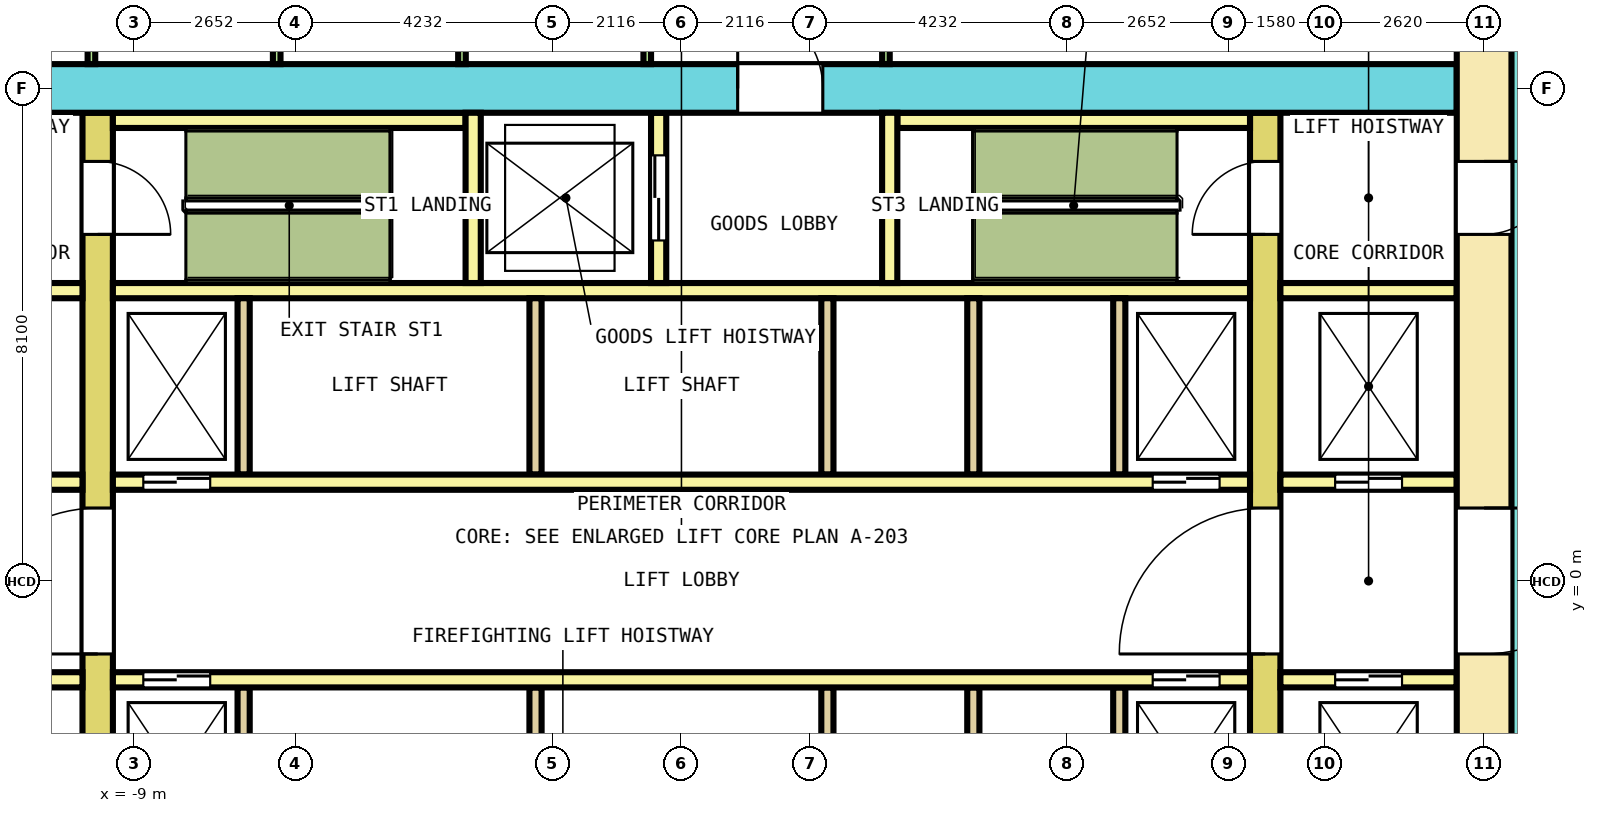
"""IFC4 building model, lengths in metres.
Left out: names, types, materials, properties, quantities, classifications, styles, units other than length and angle.
Written with IfcOpenShell. Run it as: python <this file> out.ifc"""

import sys

from ifc_helpers import new_model, si_unit, direction, frame, frame_2d, origin, place, context, subcontext, project, spatial, rectangle, extrude, element, fill, save


model = new_model("IFC4")
c1 = context("Model", 3, precision=1e-05, world=origin(), true_north=direction((0.0, 1.0)))
c2 = subcontext(c1, "Body", "Model", "MODEL_VIEW")
j1 = project(units=[si_unit("LENGTHUNIT", "METRE"), si_unit("PLANEANGLEUNIT", "RADIAN")], contexts=[c1])
p1 = place(None, origin())
s1 = spatial("IfcSite", under=j1, at=p1, CompositionType="ELEMENT")
p2 = place(p1, origin())
s2 = spatial("IfcBuilding", under=s1, at=p2, CompositionType="ELEMENT")
p3 = place(p2, frame((0.0, 0.0, 5.6)))
s3 = spatial("IfcBuildingStorey", under=s2, at=p3, CompositionType="ELEMENT", Elevation=5.6)
p4 = place(p3, frame((13.2, -10.35, 0.0), z_axis=(0.0, 0.0, 1.0), x_axis=(0.0, 1.0, 0.0)))
e1 = element("IfcWall", 1, at=p4, inside=s3, PredefinedType="SHEAR", context=c2, shape_type="SweptSolid", body=[
    extrude(rectangle(XDim=20.7, YDim=0.9, at=frame_2d((10.35, 0.0))), origin(), (0.0, 0.0, 1.0), 4.3),
])
p5 = place(p4, frame((9.15, 0.0, 0.0)))
e2 = element("IfcOpeningElement", 2, at=p5, cuts=e1, PredefinedType="OPENING", context=c2, shape_type="SweptSolid", body=[
    extrude(rectangle(XDim=2.4, YDim=2.1, at=frame_2d((1.2, 1.05))), frame((0.0, 0.46, 0.0), z_axis=(0.0, -1.0, 0.0), x_axis=(1.0, 0.0, 0.0)), (0.0, 0.0, 1.0), 0.92),
])
p6 = place(p4, frame((16.05, 0.0, 0.0)))
e3 = element("IfcOpeningElement", 3, at=p6, cuts=e1, PredefinedType="OPENING", context=c2, shape_type="SweptSolid", body=[
    extrude(rectangle(XDim=1.2, YDim=2.1, at=frame_2d((0.6, 1.05))), frame((0.0, 0.46, 0.0), z_axis=(0.0, -1.0, 0.0), x_axis=(1.0, 0.0, 0.0)), (0.0, 0.0, 1.0), 0.92),
])
p7 = place(p4, frame((2.819, 0.0, 0.0)))
e4 = element("IfcOpeningElement", 4, at=p7, cuts=e1, PredefinedType="OPENING", context=c2, shape_type="SweptSolid", body=[
    extrude(rectangle(XDim=1.0, YDim=2.1, at=frame_2d((0.5, 1.05))), frame((0.0, 0.46, 0.0), z_axis=(0.0, -1.0, 0.0), x_axis=(1.0, 0.0, 0.0)), (0.0, 0.0, 1.0), 0.92),
])
p8 = place(p4, frame((4.281, 0.0, 0.0)))
e5 = element("IfcOpeningElement", 5, at=p8, cuts=e1, PredefinedType="OPENING", context=c2, shape_type="SweptSolid", body=[
    extrude(rectangle(XDim=1.0, YDim=2.1, at=frame_2d((0.5, 1.05))), frame((0.0, 0.46, 0.0), z_axis=(0.0, -1.0, 0.0), x_axis=(1.0, 0.0, 0.0)), (0.0, 0.0, 1.0), 0.92),
])
p9 = place(p3, frame((-12.75, 8.1, 0.0), z_axis=(0.0, 0.0, 1.0), x_axis=(1.0, 0.0, 0.0)))
e6 = element("IfcWall", 6, at=p9, inside=s3, PredefinedType="SHEAR", context=c2, shape_type="SweptSolid", body=[
    extrude(rectangle(XDim=25.5, YDim=0.8, at=frame_2d((12.75, 0.0))), origin(), (0.0, 0.0, 1.0), 4.3),
])
p10 = place(p9, frame((13.675, 0.0, 0.0)))
e7 = element("IfcOpeningElement", 7, at=p10, cuts=e6, PredefinedType="OPENING", context=c2, shape_type="SweptSolid", body=[
    extrude(rectangle(XDim=1.4, YDim=2.1, at=frame_2d((0.7, 1.05))), frame((0.0, 0.41, 0.0), z_axis=(0.0, -1.0, 0.0), x_axis=(1.0, 0.0, 0.0)), (0.0, 0.0, 1.0), 0.82),
])
p11 = place(p3, frame((-9.6, -7.7, 0.0), z_axis=(0.0, 0.0, 1.0), x_axis=(0.0, 1.0, 0.0)))
e8 = element("IfcWall", 8, at=p11, inside=s3, PredefinedType="SHEAR", context=c2, shape_type="SweptSolid", body=[
    extrude(rectangle(XDim=15.4, YDim=0.5, at=frame_2d((7.7, 0.0))), origin(), (0.0, 0.0, 1.0), 4.3),
])
p12 = place(p11, frame((6.5, 0.0, 0.0)))
e9 = element("IfcOpeningElement", 9, at=p12, cuts=e8, PredefinedType="OPENING", context=c2, shape_type="SweptSolid", body=[
    extrude(rectangle(XDim=2.4, YDim=2.1, at=frame_2d((1.2, 1.05))), frame((0.0, 0.26, 0.0), z_axis=(0.0, -1.0, 0.0), x_axis=(1.0, 0.0, 0.0)), (0.0, 0.0, 1.0), 0.52),
])
p13 = place(p11, frame((13.4, 0.0, 0.0)))
e10 = element("IfcOpeningElement", 10, at=p13, cuts=e8, PredefinedType="OPENING", context=c2, shape_type="SweptSolid", body=[
    extrude(rectangle(XDim=1.2, YDim=2.1, at=frame_2d((0.6, 1.05))), frame((0.0, 0.26, 0.0), z_axis=(0.0, -1.0, 0.0), x_axis=(1.0, 0.0, 0.0)), (0.0, 0.0, 1.0), 0.52),
])
p14 = place(p11, frame((0.8, 0.0, 0.0)))
e11 = element("IfcOpeningElement", 11, at=p14, cuts=e8, PredefinedType="OPENING", context=c2, shape_type="SweptSolid", body=[
    extrude(rectangle(XDim=1.2, YDim=2.1, at=frame_2d((0.6, 1.05))), frame((0.0, 0.26, 0.0), z_axis=(0.0, -1.0, 0.0), x_axis=(1.0, 0.0, 0.0)), (0.0, 0.0, 1.0), 0.52),
])
p15 = place(p3, frame((9.6, -7.7, 0.0), z_axis=(0.0, 0.0, 1.0), x_axis=(0.0, 1.0, 0.0)))
e12 = element("IfcWall", 12, at=p15, inside=s3, PredefinedType="SHEAR", context=c2, shape_type="SweptSolid", body=[
    extrude(rectangle(XDim=15.4, YDim=0.5, at=frame_2d((7.7, 0.0))), origin(), (0.0, 0.0, 1.0), 4.3),
])
p16 = place(p15, frame((6.5, 0.0, 0.0)))
e13 = element("IfcOpeningElement", 13, at=p16, cuts=e12, PredefinedType="OPENING", context=c2, shape_type="SweptSolid", body=[
    extrude(rectangle(XDim=2.4, YDim=2.1, at=frame_2d((1.2, 1.05))), frame((0.0, 0.26, 0.0), z_axis=(0.0, -1.0, 0.0), x_axis=(1.0, 0.0, 0.0)), (0.0, 0.0, 1.0), 0.52),
])
p17 = place(p15, frame((13.4, 0.0, 0.0)))
e14 = element("IfcOpeningElement", 14, at=p17, cuts=e12, PredefinedType="OPENING", context=c2, shape_type="SweptSolid", body=[
    extrude(rectangle(XDim=1.2, YDim=2.1, at=frame_2d((0.6, 1.05))), frame((0.0, 0.26, 0.0), z_axis=(0.0, -1.0, 0.0), x_axis=(1.0, 0.0, 0.0)), (0.0, 0.0, 1.0), 0.52),
])
p18 = place(p15, frame((0.9, 0.0, 0.0)))
e15 = element("IfcOpeningElement", 15, at=p18, cuts=e12, PredefinedType="OPENING", context=c2, shape_type="SweptSolid", body=[
    extrude(rectangle(XDim=1.0, YDim=2.1, at=frame_2d((0.5, 1.05))), frame((0.0, 0.26, 0.0), z_axis=(0.0, -1.0, 0.0), x_axis=(1.0, 0.0, 0.0)), (0.0, 0.0, 1.0), 0.52),
])
p19 = place(p3, frame((-12.75, 1.625, 0.0), z_axis=(0.0, 0.0, 1.0), x_axis=(1.0, 0.0, 0.0)))
e16 = element("IfcWall", 16, at=p19, inside=s3, PredefinedType="SOLIDWALL", context=c2, shape_type="SweptSolid", body=[
    extrude(rectangle(XDim=2.9, YDim=0.25, at=frame_2d((1.45, 0.0))), origin(), (0.0, 0.0, 1.0), 4.3),
])
p20 = place(p19, frame((0.9, 0.0, 0.0)))
e17 = element("IfcOpeningElement", 17, at=p20, cuts=e16, PredefinedType="OPENING", context=c2, shape_type="SweptSolid", body=[
    extrude(rectangle(XDim=1.1, YDim=2.1, at=frame_2d((0.55, 1.05))), frame((0.0, 0.135, 0.0), z_axis=(0.0, -1.0, 0.0), x_axis=(1.0, 0.0, 0.0)), (0.0, 0.0, 1.0), 0.27),
])
p21 = place(p3, frame((-9.35, 1.625, 0.0), z_axis=(0.0, 0.0, 1.0), x_axis=(1.0, 0.0, 0.0)))
e18 = element("IfcWall", 18, at=p21, inside=s3, PredefinedType="SOLIDWALL", context=c2, shape_type="SweptSolid", body=[
    extrude(rectangle(XDim=18.7, YDim=0.25, at=frame_2d((9.35, 0.0))), origin(), (0.0, 0.0, 1.0), 4.3),
])
p22 = place(p21, frame((0.5, 0.0, 0.0)))
e19 = element("IfcOpeningElement", 19, at=p22, cuts=e18, PredefinedType="OPENING", context=c2, shape_type="SweptSolid", body=[
    extrude(rectangle(XDim=1.1, YDim=2.1, at=frame_2d((0.55, 1.05))), frame((0.0, 0.135, 0.0), z_axis=(0.0, -1.0, 0.0), x_axis=(1.0, 0.0, 0.0)), (0.0, 0.0, 1.0), 0.27),
])
p23 = place(p21, frame((17.1, 0.0, 0.0)))
e20 = element("IfcOpeningElement", 20, at=p23, cuts=e18, PredefinedType="OPENING", context=c2, shape_type="SweptSolid", body=[
    extrude(rectangle(XDim=1.1, YDim=2.1, at=frame_2d((0.55, 1.05))), frame((0.0, 0.135, 0.0), z_axis=(0.0, -1.0, 0.0), x_axis=(1.0, 0.0, 0.0)), (0.0, 0.0, 1.0), 0.27),
])
p24 = place(p3, frame((9.85, 1.625, 0.0), z_axis=(0.0, 0.0, 1.0), x_axis=(1.0, 0.0, 0.0)))
e21 = element("IfcWall", 21, at=p24, inside=s3, PredefinedType="SOLIDWALL", context=c2, shape_type="SweptSolid", body=[
    extrude(rectangle(XDim=2.9, YDim=0.25, at=frame_2d((1.45, 0.0))), origin(), (0.0, 0.0, 1.0), 4.3),
])
p25 = place(p24, frame((0.9, 0.0, 0.0)))
e22 = element("IfcOpeningElement", 22, at=p25, cuts=e21, PredefinedType="OPENING", context=c2, shape_type="SweptSolid", body=[
    extrude(rectangle(XDim=1.1, YDim=2.1, at=frame_2d((0.55, 1.05))), frame((0.0, 0.135, 0.0), z_axis=(0.0, -1.0, 0.0), x_axis=(1.0, 0.0, 0.0)), (0.0, 0.0, 1.0), 0.27),
])
p26 = place(p3, frame((-12.75, 4.775, 0.0), z_axis=(0.0, 0.0, 1.0), x_axis=(1.0, 0.0, 0.0)))
e23 = element("IfcWall", 23, at=p26, inside=s3, PredefinedType="SOLIDWALL", context=c2, shape_type="SweptSolid", body=[
    extrude(rectangle(XDim=2.9, YDim=0.25, at=frame_2d((1.45, 0.0))), origin(), (0.0, 0.0, 1.0), 4.3),
])
p27 = place(p3, frame((-9.35, 4.775, 0.0), z_axis=(0.0, 0.0, 1.0), x_axis=(1.0, 0.0, 0.0)))
e24 = element("IfcWall", 24, at=p27, inside=s3, PredefinedType="SOLIDWALL", context=c2, shape_type="SweptSolid", body=[
    extrude(rectangle(XDim=18.7, YDim=0.25, at=frame_2d((9.35, 0.0))), origin(), (0.0, 0.0, 1.0), 4.3),
])
p28 = place(p3, frame((9.85, 4.775, 0.0), z_axis=(0.0, 0.0, 1.0), x_axis=(1.0, 0.0, 0.0)))
e25 = element("IfcWall", 25, at=p28, inside=s3, PredefinedType="SOLIDWALL", context=c2, shape_type="SweptSolid", body=[
    extrude(rectangle(XDim=2.9, YDim=0.25, at=frame_2d((1.45, 0.0))), origin(), (0.0, 0.0, 1.0), 4.3),
])
for number, where, z_axis, x_axis in (
    (26, (-7.2, 1.75, 0.0), (0.0, 0.0, 1.0), (0.0, 1.0, 0.0)),
    (27, (-2.4, 1.75, 0.0), (0.0, 0.0, 1.0), (0.0, 1.0, 0.0)),
    (28, (2.4, 1.75, 0.0), (0.0, 0.0, 1.0), (0.0, 1.0, 0.0)),
    (29, (4.8, 1.75, 0.0), (0.0, 0.0, 1.0), (0.0, 1.0, 0.0)),
    (30, (7.2, 1.75, 0.0), (0.0, 0.0, 1.0), (0.0, 1.0, 0.0)),
):
    element("IfcWall", number, at=place(p3, frame(where, z_axis=z_axis, x_axis=x_axis)), inside=s3, PredefinedType="SOLIDWALL", context=c2, shape_type="SweptSolid", body=[
        extrude(rectangle(XDim=2.9, YDim=0.2, at=frame_2d((1.45, 0.0))), origin(), (0.0, 0.0, 1.0), 4.3),
    ])
p29 = place(p3, frame((-12.75, -1.625, 0.0), z_axis=(0.0, 0.0, 1.0), x_axis=(1.0, 0.0, 0.0)))
e31 = element("IfcWall", 31, at=p29, inside=s3, PredefinedType="SOLIDWALL", context=c2, shape_type="SweptSolid", body=[
    extrude(rectangle(XDim=2.9, YDim=0.25, at=frame_2d((1.45, 0.0))), origin(), (0.0, 0.0, 1.0), 4.3),
])
p30 = place(p29, frame((0.9, 0.0, 0.0)))
e32 = element("IfcOpeningElement", 32, at=p30, cuts=e31, PredefinedType="OPENING", context=c2, shape_type="SweptSolid", body=[
    extrude(rectangle(XDim=1.1, YDim=2.1, at=frame_2d((0.55, 1.05))), frame((0.0, 0.135, 0.0), z_axis=(0.0, -1.0, 0.0), x_axis=(1.0, 0.0, 0.0)), (0.0, 0.0, 1.0), 0.27),
])
p31 = place(p3, frame((-9.35, -1.625, 0.0), z_axis=(0.0, 0.0, 1.0), x_axis=(1.0, 0.0, 0.0)))
e33 = element("IfcWall", 33, at=p31, inside=s3, PredefinedType="SOLIDWALL", context=c2, shape_type="SweptSolid", body=[
    extrude(rectangle(XDim=18.7, YDim=0.25, at=frame_2d((9.35, 0.0))), origin(), (0.0, 0.0, 1.0), 4.3),
])
p32 = place(p31, frame((0.5, 0.0, 0.0)))
e34 = element("IfcOpeningElement", 34, at=p32, cuts=e33, PredefinedType="OPENING", context=c2, shape_type="SweptSolid", body=[
    extrude(rectangle(XDim=1.1, YDim=2.1, at=frame_2d((0.55, 1.05))), frame((0.0, 0.135, 0.0), z_axis=(0.0, -1.0, 0.0), x_axis=(1.0, 0.0, 0.0)), (0.0, 0.0, 1.0), 0.27),
])
p33 = place(p31, frame((17.1, 0.0, 0.0)))
e35 = element("IfcOpeningElement", 35, at=p33, cuts=e33, PredefinedType="OPENING", context=c2, shape_type="SweptSolid", body=[
    extrude(rectangle(XDim=1.1, YDim=2.1, at=frame_2d((0.55, 1.05))), frame((0.0, 0.135, 0.0), z_axis=(0.0, -1.0, 0.0), x_axis=(1.0, 0.0, 0.0)), (0.0, 0.0, 1.0), 0.27),
])
p34 = place(p3, frame((9.85, -1.625, 0.0), z_axis=(0.0, 0.0, 1.0), x_axis=(1.0, 0.0, 0.0)))
e36 = element("IfcWall", 36, at=p34, inside=s3, PredefinedType="SOLIDWALL", context=c2, shape_type="SweptSolid", body=[
    extrude(rectangle(XDim=2.9, YDim=0.25, at=frame_2d((1.45, 0.0))), origin(), (0.0, 0.0, 1.0), 4.3),
])
p35 = place(p34, frame((0.9, 0.0, 0.0)))
e37 = element("IfcOpeningElement", 37, at=p35, cuts=e36, PredefinedType="OPENING", context=c2, shape_type="SweptSolid", body=[
    extrude(rectangle(XDim=1.1, YDim=2.1, at=frame_2d((0.55, 1.05))), frame((0.0, 0.135, 0.0), z_axis=(0.0, -1.0, 0.0), x_axis=(1.0, 0.0, 0.0)), (0.0, 0.0, 1.0), 0.27),
])
for number, where, z_axis, x_axis in (
    (38, (-7.2, -4.65, 0.0), (0.0, 0.0, 1.0), (0.0, 1.0, 0.0)),
    (39, (-2.4, -4.65, 0.0), (0.0, 0.0, 1.0), (0.0, 1.0, 0.0)),
    (40, (2.4, -4.65, 0.0), (0.0, 0.0, 1.0), (0.0, 1.0, 0.0)),
    (41, (4.8, -4.65, 0.0), (0.0, 0.0, 1.0), (0.0, 1.0, 0.0)),
    (42, (7.2, -4.65, 0.0), (0.0, 0.0, 1.0), (0.0, 1.0, 0.0)),
):
    element("IfcWall", number, at=place(p3, frame(where, z_axis=z_axis, x_axis=x_axis)), inside=s3, PredefinedType="SOLIDWALL", context=c2, shape_type="SweptSolid", body=[
        extrude(rectangle(XDim=2.9, YDim=0.2, at=frame_2d((1.45, 0.0))), origin(), (0.0, 0.0, 1.0), 4.3),
    ])
for number, where, z_axis, x_axis in (
    (43, (-9.35, 7.575, 0.0), (0.0, 0.0, 1.0), (1.0, 0.0, 0.0)),
    (44, (3.55, 7.575, 0.0), (0.0, 0.0, 1.0), (1.0, 0.0, 0.0)),
):
    element("IfcWall", number, at=place(p3, frame(where, z_axis=z_axis, x_axis=x_axis)), inside=s3, PredefinedType="SOLIDWALL", context=c2, shape_type="SweptSolid", body=[
        extrude(rectangle(XDim=5.8, YDim=0.25, at=frame_2d((2.9, 0.0))), origin(), (0.0, 0.0, 1.0), 4.3),
    ])
p36 = place(p3, frame((-3.425, 4.9, 0.0), z_axis=(0.0, 0.0, 1.0), x_axis=(0.0, 1.0, 0.0)))
e45 = element("IfcWall", 45, at=p36, inside=s3, PredefinedType="SOLIDWALL", context=c2, shape_type="SweptSolid", body=[
    extrude(rectangle(XDim=2.8, YDim=0.25, at=frame_2d((1.4, 0.0))), origin(), (0.0, 0.0, 1.0), 4.3),
])
p37 = place(p3, frame((-0.375, 4.9, 0.0), z_axis=(0.0, 0.0, 1.0), x_axis=(0.0, 1.0, 0.0)))
e46 = element("IfcWall", 46, at=p37, inside=s3, PredefinedType="SOLIDWALL", context=c2, shape_type="SweptSolid", body=[
    extrude(rectangle(XDim=2.8, YDim=0.25, at=frame_2d((1.4, 0.0))), origin(), (0.0, 0.0, 1.0), 4.3),
])
p38 = place(p37, frame((0.7, 0.0, 0.0)))
e47 = element("IfcOpeningElement", 47, at=p38, cuts=e46, PredefinedType="OPENING", context=c2, shape_type="SweptSolid", body=[
    extrude(rectangle(XDim=1.4, YDim=2.1, at=frame_2d((0.7, 1.05))), frame((0.0, 0.135, 0.0), z_axis=(0.0, -1.0, 0.0), x_axis=(1.0, 0.0, 0.0)), (0.0, 0.0, 1.0), 0.27),
])
p39 = place(p3, frame((3.425, 4.9, 0.0), z_axis=(0.0, 0.0, 1.0), x_axis=(0.0, 1.0, 0.0)))
e48 = element("IfcWall", 48, at=p39, inside=s3, PredefinedType="SOLIDWALL", context=c2, shape_type="SweptSolid", body=[
    extrude(rectangle(XDim=2.8, YDim=0.25, at=frame_2d((1.4, 0.0))), origin(), (0.0, 0.0, 1.0), 4.3),
])
for number, where, z_axis, x_axis in (
    (49, (-9.703, 8.5, 0.0), (0.0, 0.0, 1.0), (0.0, 1.0, 0.0)),
    (50, (-6.656, 8.5, 0.0), (0.0, 0.0, 1.0), (0.0, 1.0, 0.0)),
    (51, (-3.609, 8.5, 0.0), (0.0, 0.0, 1.0), (0.0, 1.0, 0.0)),
    (52, (-0.562, 8.5, 0.0), (0.0, 0.0, 1.0), (0.0, 1.0, 0.0)),
    (53, (3.363, 8.5, 0.0), (0.0, 0.0, 1.0), (0.0, 1.0, 0.0)),
):
    element("IfcWall", number, at=place(p3, frame(where, z_axis=z_axis, x_axis=x_axis)), inside=s3, PredefinedType="PARTITIONING", context=c2, shape_type="SweptSolid", body=[
        extrude(rectangle(XDim=1.85, YDim=0.125, at=frame_2d((0.925, 0.0))), origin(), (0.0, 0.0, 1.0), 4.3),
    ])
p40 = place(p22, origin())
e54 = element("IfcDoor", 54, at=p40, inside=s3, OperationType="DOUBLE_DOOR_SLIDING", PredefinedType="DOOR", context=c2, shape_type="SweptSolid", body=[
    extrude(rectangle(XDim=1.1, YDim=2.1, at=frame_2d((0.55, 1.05))), frame((0.0, 0.075, 0.0), z_axis=(0.0, -1.0, 0.0), x_axis=(1.0, 0.0, 0.0)), (0.0, 0.0, 1.0), 0.15),
])
fill(e19, e54)
p41 = place(p23, origin())
e55 = element("IfcDoor", 55, at=p41, inside=s3, OperationType="DOUBLE_DOOR_SLIDING", PredefinedType="DOOR", context=c2, shape_type="SweptSolid", body=[
    extrude(rectangle(XDim=1.1, YDim=2.1, at=frame_2d((0.55, 1.05))), frame((0.0, 0.075, 0.0), z_axis=(0.0, -1.0, 0.0), x_axis=(1.0, 0.0, 0.0)), (0.0, 0.0, 1.0), 0.15),
])
fill(e20, e55)
p42 = place(p25, origin())
e56 = element("IfcDoor", 56, at=p42, inside=s3, OperationType="DOUBLE_DOOR_SLIDING", PredefinedType="DOOR", context=c2, shape_type="SweptSolid", body=[
    extrude(rectangle(XDim=1.1, YDim=2.1, at=frame_2d((0.55, 1.05))), frame((0.0, 0.075, 0.0), z_axis=(0.0, -1.0, 0.0), x_axis=(1.0, 0.0, 0.0)), (0.0, 0.0, 1.0), 0.15),
])
fill(e22, e56)
p43 = place(p32, origin())
e57 = element("IfcDoor", 57, at=p43, inside=s3, OperationType="DOUBLE_DOOR_SLIDING", PredefinedType="DOOR", context=c2, shape_type="SweptSolid", body=[
    extrude(rectangle(XDim=1.1, YDim=2.1, at=frame_2d((0.55, 1.05))), frame((0.0, 0.075, 0.0), z_axis=(0.0, -1.0, 0.0), x_axis=(1.0, 0.0, 0.0)), (0.0, 0.0, 1.0), 0.15),
])
fill(e34, e57)
p44 = place(p33, origin())
e58 = element("IfcDoor", 58, at=p44, inside=s3, OperationType="DOUBLE_DOOR_SLIDING", PredefinedType="DOOR", context=c2, shape_type="SweptSolid", body=[
    extrude(rectangle(XDim=1.1, YDim=2.1, at=frame_2d((0.55, 1.05))), frame((0.0, 0.075, 0.0), z_axis=(0.0, -1.0, 0.0), x_axis=(1.0, 0.0, 0.0)), (0.0, 0.0, 1.0), 0.15),
])
fill(e35, e58)
p45 = place(p35, origin())
e59 = element("IfcDoor", 59, at=p45, inside=s3, OperationType="DOUBLE_DOOR_SLIDING", PredefinedType="DOOR", context=c2, shape_type="SweptSolid", body=[
    extrude(rectangle(XDim=1.1, YDim=2.1, at=frame_2d((0.55, 1.05))), frame((0.0, 0.075, 0.0), z_axis=(0.0, -1.0, 0.0), x_axis=(1.0, 0.0, 0.0)), (0.0, 0.0, 1.0), 0.15),
])
fill(e37, e59)
p46 = place(p38, origin())
e60 = element("IfcDoor", 60, at=p46, inside=s3, OperationType="DOUBLE_DOOR_SLIDING", PredefinedType="DOOR", context=c2, shape_type="SweptSolid", body=[
    extrude(rectangle(XDim=1.4, YDim=2.1, at=frame_2d((0.7, 1.05))), frame((0.0, 0.075, 0.0), z_axis=(0.0, -1.0, 0.0), x_axis=(1.0, 0.0, 0.0)), (0.0, 0.0, 1.0), 0.15),
])
fill(e47, e60)
p47 = place(p12, origin())
e61 = element("IfcDoor", 61, at=p47, inside=s3, OperationType="DOUBLE_DOOR_SINGLE_SWING", PredefinedType="DOOR", context=c2, shape_type="SweptSolid", body=[
    extrude(rectangle(XDim=2.4, YDim=2.1, at=frame_2d((1.2, 1.05))), frame((0.0, 0.2, 0.0), z_axis=(0.0, -1.0, 0.0), x_axis=(1.0, 0.0, 0.0)), (0.0, 0.0, 1.0), 0.4),
])
fill(e9, e61)
p48 = place(p16, origin())
e62 = element("IfcDoor", 62, at=p48, inside=s3, OperationType="DOUBLE_DOOR_SINGLE_SWING", PredefinedType="DOOR", context=c2, shape_type="SweptSolid", body=[
    extrude(rectangle(XDim=2.4, YDim=2.1, at=frame_2d((1.2, 1.05))), frame((0.0, 0.2, 0.0), z_axis=(0.0, -1.0, 0.0), x_axis=(1.0, 0.0, 0.0)), (0.0, 0.0, 1.0), 0.4),
])
fill(e13, e62)
p49 = place(p5, origin())
e63 = element("IfcDoor", 63, at=p49, inside=s3, OperationType="DOUBLE_DOOR_SINGLE_SWING", PredefinedType="DOOR", context=c2, shape_type="SweptSolid", body=[
    extrude(rectangle(XDim=2.4, YDim=2.1, at=frame_2d((1.2, 1.05))), frame((0.0, 0.3, 0.0), z_axis=(0.0, -1.0, 0.0), x_axis=(1.0, 0.0, 0.0)), (0.0, 0.0, 1.0), 0.6),
])
fill(e2, e63)
p50 = place(p13, origin())
e64 = element("IfcDoor", 64, at=p50, inside=s3, OperationType="SINGLE_SWING_LEFT", PredefinedType="DOOR", context=c2, shape_type="SweptSolid", body=[
    extrude(rectangle(XDim=1.2, YDim=2.1, at=frame_2d((0.6, 1.05))), frame((0.0, 0.2, 0.0), z_axis=(0.0, -1.0, 0.0), x_axis=(1.0, 0.0, 0.0)), (0.0, 0.0, 1.0), 0.4),
])
fill(e10, e64)
p51 = place(p17, origin())
e65 = element("IfcDoor", 65, at=p51, inside=s3, OperationType="SINGLE_SWING_LEFT", PredefinedType="DOOR", context=c2, shape_type="SweptSolid", body=[
    extrude(rectangle(XDim=1.2, YDim=2.1, at=frame_2d((0.6, 1.05))), frame((0.0, 0.2, 0.0), z_axis=(0.0, -1.0, 0.0), x_axis=(1.0, 0.0, 0.0)), (0.0, 0.0, 1.0), 0.4),
])
fill(e14, e65)
p52 = place(p6, origin())
e66 = element("IfcDoor", 66, at=p52, inside=s3, OperationType="SINGLE_SWING_RIGHT", PredefinedType="DOOR", context=c2, shape_type="SweptSolid", body=[
    extrude(rectangle(XDim=1.2, YDim=2.1, at=frame_2d((0.6, 1.05))), frame((0.0, 0.3, 0.0), z_axis=(0.0, -1.0, 0.0), x_axis=(1.0, 0.0, 0.0)), (0.0, 0.0, 1.0), 0.6),
])
fill(e3, e66)
p53 = place(p10, origin())
e67 = element("IfcDoor", 67, at=p53, inside=s3, OperationType="DOUBLE_DOOR_SINGLE_SWING", PredefinedType="DOOR", context=c2, shape_type="SweptSolid", body=[
    extrude(rectangle(XDim=1.4, YDim=2.1, at=frame_2d((0.7, 1.05))), frame((0.0, 0.3, 0.0), z_axis=(0.0, -1.0, 0.0), x_axis=(1.0, 0.0, 0.0)), (0.0, 0.0, 1.0), 0.6),
])
fill(e7, e67)
save(model, sys.argv[1])
